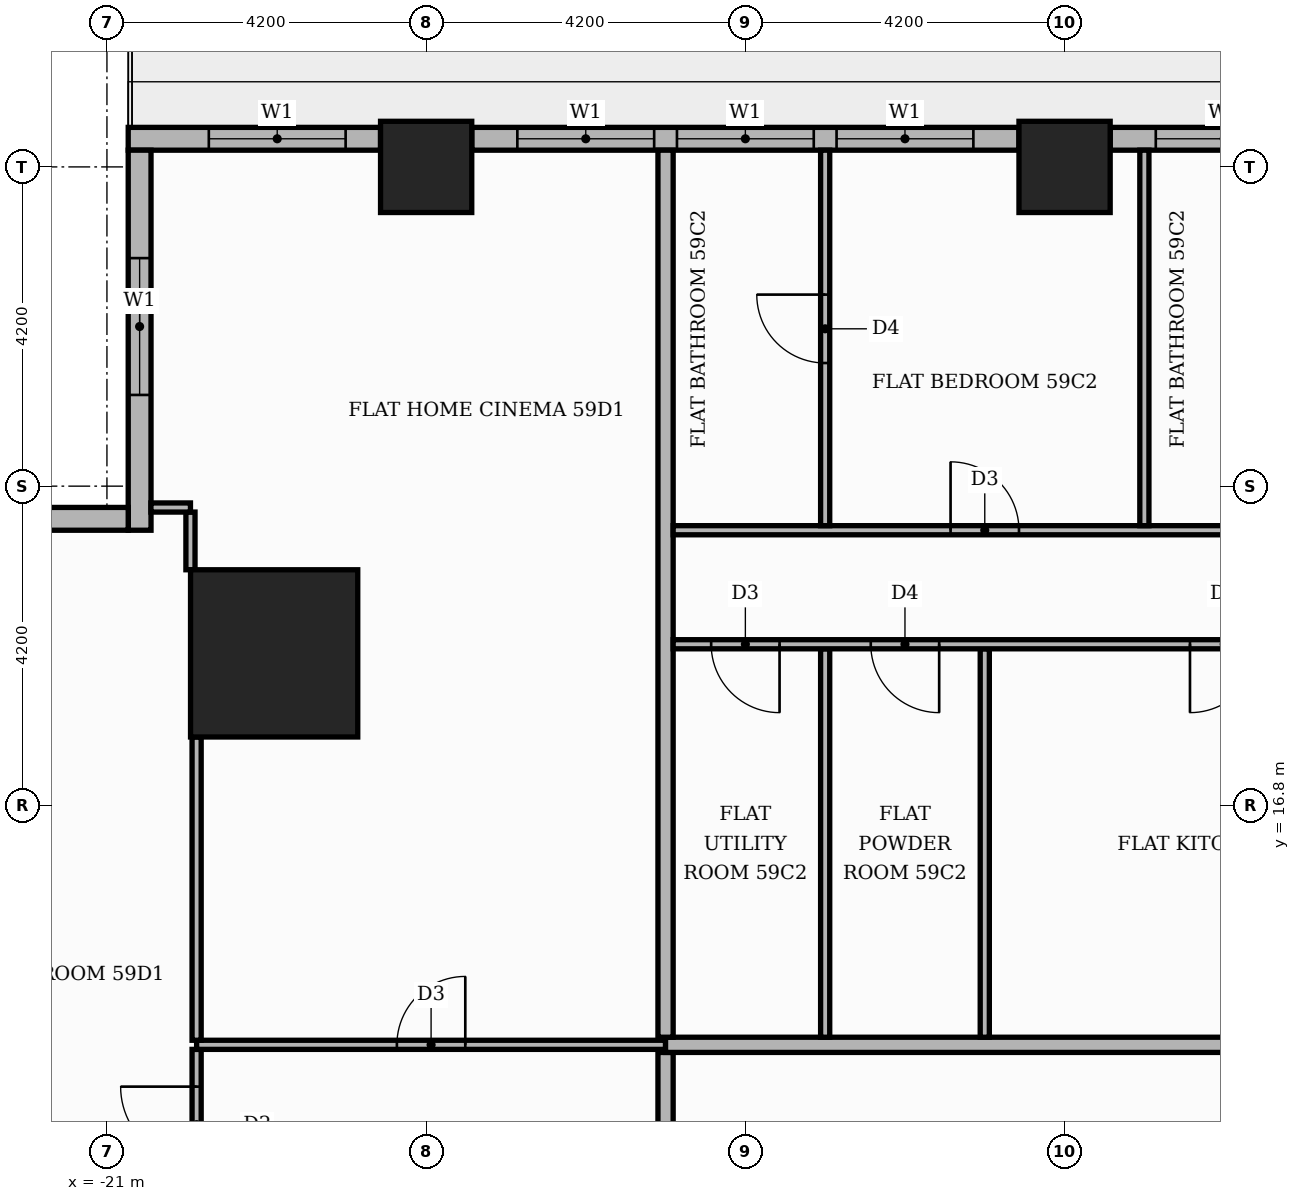
"""IFC4 building model, lengths in metres.
Left out: names, types, materials, properties, quantities, classifications, styles, units other than length and angle.
Written with IfcOpenShell. Run it as: python <this file> out.ifc"""

import sys

from ifc_helpers import new_model, si_unit, direction, frame, frame_2d, origin, origin_2d, place, context, subcontext, project, spatial, rectangle, extrude, element, fill, save


model = new_model("IFC4")
c1 = context("Model", 3, precision=1e-05, world=origin(), true_north=direction((0.0, 1.0)))
c2 = subcontext(c1, "Body", "Model", "MODEL_VIEW")
j1 = project(units=[si_unit("LENGTHUNIT", "METRE"), si_unit("PLANEANGLEUNIT", "RADIAN")], contexts=[c1])
p1 = place(None, origin())
s1 = spatial("IfcSite", under=j1, at=p1, CompositionType="ELEMENT")
p2 = place(p1, origin())
s2 = spatial("IfcBuilding", under=s1, at=p2, CompositionType="ELEMENT")
p3 = place(p2, frame((0.0, 0.0, 248.4)))
s3 = spatial("IfcBuildingStorey", under=s2, at=p3, CompositionType="ELEMENT", Elevation=248.4)
p4 = place(p3, frame((-18.8, 18.8, 0.0), z_axis=(0.0, 0.0, 1.0), x_axis=(1.0, 0.0, 0.0)))
e1 = element("IfcColumn", 1, at=p4, inside=s3, PredefinedType="COLUMN", context=c2, shape_type="SweptSolid", body=[
    extrude(rectangle(XDim=2.2, YDim=2.2, at=origin_2d()), origin(), (0.0, 0.0, 1.0), 3.9),
])
for number, where, z_axis, x_axis in (
    (2, (-8.4, 25.2, 0.0), (0.0, 0.0, 1.0), (1.0, 0.0, 0.0)),
    (3, (-16.8, 25.2, 0.0), (0.0, 0.0, 1.0), (1.0, 0.0, 0.0)),
):
    element("IfcColumn", number, at=place(p3, frame(where, z_axis=z_axis, x_axis=x_axis)), inside=s3, PredefinedType="COLUMN", context=c2, shape_type="SweptSolid", body=[
        extrude(rectangle(XDim=1.2, YDim=1.2, at=origin_2d()), origin(), (0.0, 0.0, 1.0), 3.9),
    ])
p5 = place(p3, frame((-0.6, 25.57, 0.0), z_axis=(0.0, 0.0, 1.0), x_axis=(-1.0, 0.0, 0.0)))
e4 = element("IfcWall", 4, at=p5, inside=s3, PredefinedType="STANDARD", context=c2, shape_type="SweptSolid", body=[
    extrude(rectangle(XDim=7.2, YDim=0.3, at=frame_2d((3.6, 0.0))), origin(), (0.0, 0.0, 1.0), 3.48),
])
p6 = place(p5, frame((0.6, 0.0, 0.0)))
e5 = element("IfcOpeningElement", 5, at=p6, cuts=e4, PredefinedType="OPENING", context=c2, shape_type="SweptSolid", body=[
    extrude(rectangle(XDim=1.8, YDim=2.4, at=frame_2d((0.9, 1.2))), frame((0.0, 0.16, 0.0), z_axis=(0.0, -1.0, 0.0), x_axis=(1.0, 0.0, 0.0)), (0.0, 0.0, 1.0), 0.32),
])
p7 = place(p5, frame((2.7, 0.0, 0.9)))
e6 = element("IfcOpeningElement", 6, at=p7, cuts=e4, PredefinedType="OPENING", context=c2, shape_type="SweptSolid", body=[
    extrude(rectangle(XDim=1.8, YDim=2.1, at=frame_2d((0.9, 1.05))), frame((0.0, 0.16, 0.0), z_axis=(0.0, -1.0, 0.0), x_axis=(1.0, 0.0, 0.0)), (0.0, 0.0, 1.0), 0.32),
])
p8 = place(p5, frame((4.8, 0.0, 0.9)))
e7 = element("IfcOpeningElement", 7, at=p8, cuts=e4, PredefinedType="OPENING", context=c2, shape_type="SweptSolid", body=[
    extrude(rectangle(XDim=1.8, YDim=2.1, at=frame_2d((0.9, 1.05))), frame((0.0, 0.16, 0.0), z_axis=(0.0, -1.0, 0.0), x_axis=(1.0, 0.0, 0.0)), (0.0, 0.0, 1.0), 0.32),
])
p9 = place(p3, frame((-9.0, 25.57, 0.0), z_axis=(0.0, 0.0, 1.0), x_axis=(-1.0, 0.0, 0.0)))
e8 = element("IfcWall", 8, at=p9, inside=s3, PredefinedType="STANDARD", context=c2, shape_type="SweptSolid", body=[
    extrude(rectangle(XDim=7.2, YDim=0.3, at=frame_2d((3.6, 0.0))), origin(), (0.0, 0.0, 1.0), 3.48),
])
p10 = place(p9, frame((0.6, 0.0, 0.9)))
e9 = element("IfcOpeningElement", 9, at=p10, cuts=e8, PredefinedType="OPENING", context=c2, shape_type="SweptSolid", body=[
    extrude(rectangle(XDim=1.8, YDim=2.1, at=frame_2d((0.9, 1.05))), frame((0.0, 0.16, 0.0), z_axis=(0.0, -1.0, 0.0), x_axis=(1.0, 0.0, 0.0)), (0.0, 0.0, 1.0), 0.32),
])
p11 = place(p9, frame((2.7, 0.0, 0.9)))
e10 = element("IfcOpeningElement", 10, at=p11, cuts=e8, PredefinedType="OPENING", context=c2, shape_type="SweptSolid", body=[
    extrude(rectangle(XDim=1.8, YDim=2.1, at=frame_2d((0.9, 1.05))), frame((0.0, 0.16, 0.0), z_axis=(0.0, -1.0, 0.0), x_axis=(1.0, 0.0, 0.0)), (0.0, 0.0, 1.0), 0.32),
])
p12 = place(p9, frame((4.8, 0.0, 0.9)))
e11 = element("IfcOpeningElement", 11, at=p12, cuts=e8, PredefinedType="OPENING", context=c2, shape_type="SweptSolid", body=[
    extrude(rectangle(XDim=1.8, YDim=2.1, at=frame_2d((0.9, 1.05))), frame((0.0, 0.16, 0.0), z_axis=(0.0, -1.0, 0.0), x_axis=(1.0, 0.0, 0.0)), (0.0, 0.0, 1.0), 0.32),
])
p13 = place(p3, frame((-17.4, 25.57, 0.0), z_axis=(0.0, 0.0, 1.0), x_axis=(-1.0, 0.0, 0.0)))
e12 = element("IfcWall", 12, at=p13, inside=s3, PredefinedType="STANDARD", context=c2, shape_type="SweptSolid", body=[
    extrude(rectangle(XDim=3.32, YDim=0.3, at=frame_2d((1.66, 0.0))), origin(), (0.0, 0.0, 1.0), 3.48),
])
p14 = place(p13, frame((0.459, 0.0, 0.9)))
e13 = element("IfcOpeningElement", 13, at=p14, cuts=e12, PredefinedType="OPENING", context=c2, shape_type="SweptSolid", body=[
    extrude(rectangle(XDim=1.8, YDim=2.1, at=frame_2d((0.9, 1.05))), frame((0.0, 0.16, 0.0), z_axis=(0.0, -1.0, 0.0), x_axis=(1.0, 0.0, 0.0)), (0.0, 0.0, 1.0), 0.32),
])
p15 = place(p3, frame((-20.57, 25.42, 0.0), z_axis=(0.0, 0.0, 1.0), x_axis=(0.0, -1.0, 0.0)))
e14 = element("IfcWall", 14, at=p15, inside=s3, PredefinedType="STANDARD", context=c2, shape_type="SweptSolid", body=[
    extrude(rectangle(XDim=5.0, YDim=0.3, at=frame_2d((2.5, 0.0))), origin(), (0.0, 0.0, 1.0), 3.48),
])
p16 = place(p15, frame((1.42, 0.0, 0.9)))
e15 = element("IfcOpeningElement", 15, at=p16, cuts=e14, PredefinedType="OPENING", context=c2, shape_type="SweptSolid", body=[
    extrude(rectangle(XDim=1.8, YDim=2.1, at=frame_2d((0.9, 1.05))), frame((0.0, 0.16, 0.0), z_axis=(0.0, -1.0, 0.0), x_axis=(1.0, 0.0, 0.0)), (0.0, 0.0, 1.0), 0.32),
])
p17 = place(p3, frame((-20.72, 20.57, 0.0), z_axis=(0.0, 0.0, 1.0), x_axis=(-1.0, 0.0, 0.0)))
e16 = element("IfcWall", 16, at=p17, inside=s3, PredefinedType="STANDARD", context=c2, shape_type="SweptSolid", body=[
    extrude(rectangle(XDim=5.0, YDim=0.3, at=frame_2d((2.5, 0.0))), origin(), (0.0, 0.0, 1.0), 3.48),
])
p18 = place(p17, frame((1.48, 0.0, 0.9)))
e17 = element("IfcOpeningElement", 17, at=p18, cuts=e16, PredefinedType="OPENING", context=c2, shape_type="SweptSolid", body=[
    extrude(rectangle(XDim=1.8, YDim=2.1, at=frame_2d((0.9, 1.05))), frame((0.0, 0.16, 0.0), z_axis=(0.0, -1.0, 0.0), x_axis=(1.0, 0.0, 0.0)), (0.0, 0.0, 1.0), 0.32),
])
p19 = place(p3, frame((-13.65, 11.1, 0.0), z_axis=(0.0, 0.0, 1.0), x_axis=(0.0, 1.0, 0.0)))
e18 = element("IfcWall", 18, at=p19, inside=s3, PredefinedType="PARTITIONING", context=c2, shape_type="SweptSolid", body=[
    extrude(rectangle(XDim=2.45, YDim=0.2, at=frame_2d((1.225, 0.0))), origin(), (0.0, 0.0, 1.0), 3.48),
])
p20 = place(p3, frame((-19.82, 11.61, 0.0), z_axis=(0.0, 0.0, 1.0), x_axis=(0.0, 1.0, 0.0)))
e19 = element("IfcWall", 19, at=p20, inside=s3, PredefinedType="PARTITIONING", context=c2, shape_type="SweptSolid", body=[
    extrude(rectangle(XDim=1.98, YDim=0.12, at=frame_2d((0.99, 0.0))), origin(), (0.0, 0.0, 1.0), 3.48),
])
p21 = place(p20, frame((0.49, 0.0, 0.0)))
e20 = element("IfcOpeningElement", 20, at=p21, cuts=e19, PredefinedType="OPENING", context=c2, shape_type="SweptSolid", body=[
    extrude(rectangle(XDim=1.0, YDim=2.1, at=frame_2d((0.5, 1.05))), frame((0.0, 0.07, 0.0), z_axis=(0.0, -1.0, 0.0), x_axis=(1.0, 0.0, 0.0)), (0.0, 0.0, 1.0), 0.14),
])
p22 = place(p3, frame((-19.82, 13.65, 0.0), z_axis=(0.0, 0.0, 1.0), x_axis=(1.0, 0.0, 0.0)))
e21 = element("IfcWall", 21, at=p22, inside=s3, PredefinedType="PARTITIONING", context=c2, shape_type="SweptSolid", body=[
    extrude(rectangle(XDim=6.17, YDim=0.12, at=frame_2d((3.085, 0.0))), origin(), (0.0, 0.0, 1.0), 3.48),
])
p23 = place(p22, frame((2.635, 0.0, 0.0)))
e22 = element("IfcOpeningElement", 22, at=p23, cuts=e21, PredefinedType="OPENING", context=c2, shape_type="SweptSolid", body=[
    extrude(rectangle(XDim=0.9, YDim=2.1, at=frame_2d((0.45, 1.05))), frame((0.0, 0.07, 0.0), z_axis=(0.0, -1.0, 0.0), x_axis=(1.0, 0.0, 0.0)), (0.0, 0.0, 1.0), 0.14),
])
p24 = place(p3, frame((-13.65, 13.65, 0.0), z_axis=(0.0, 0.0, 1.0), x_axis=(1.0, 0.0, 0.0)))
e23 = element("IfcWall", 23, at=p24, inside=s3, PredefinedType="PARTITIONING", context=c2, shape_type="SweptSolid", body=[
    extrude(rectangle(XDim=39.07, YDim=0.2, at=frame_2d((19.535, 0.0))), origin(), (0.0, 0.0, 1.0), 3.48),
])
p25 = place(p24, frame((24.65, 0.0, 0.0)))
e24 = element("IfcOpeningElement", 24, at=p25, cuts=e23, PredefinedType="OPENING", context=c2, shape_type="SweptSolid", body=[
    extrude(rectangle(XDim=1.1, YDim=2.4, at=frame_2d((0.55, 1.2))), frame((0.0, 0.11, 0.0), z_axis=(0.0, -1.0, 0.0), x_axis=(1.0, 0.0, 0.0)), (0.0, 0.0, 1.0), 0.22),
])
p26 = place(p24, frame((12.05, 0.0, 0.0)))
e25 = element("IfcOpeningElement", 25, at=p26, cuts=e23, PredefinedType="OPENING", context=c2, shape_type="SweptSolid", body=[
    extrude(rectangle(XDim=1.1, YDim=2.4, at=frame_2d((0.55, 1.2))), frame((0.0, 0.11, 0.0), z_axis=(0.0, -1.0, 0.0), x_axis=(1.0, 0.0, 0.0)), (0.0, 0.0, 1.0), 0.22),
])
p27 = place(p3, frame((-19.82, 13.71, 0.0), z_axis=(0.0, 0.0, 1.0), x_axis=(0.0, 1.0, 0.0)))
e26 = element("IfcWall", 26, at=p27, inside=s3, PredefinedType="PARTITIONING", context=c2, shape_type="SweptSolid", body=[
    extrude(rectangle(XDim=3.99, YDim=0.12, at=frame_2d((1.995, 0.0))), origin(), (0.0, 0.0, 1.0), 3.48),
])
p28 = place(p3, frame((-13.65, 13.75, 0.0), z_axis=(0.0, 0.0, 1.0), x_axis=(0.0, 1.0, 0.0)))
e27 = element("IfcWall", 27, at=p28, inside=s3, PredefinedType="PARTITIONING", context=c2, shape_type="SweptSolid", body=[
    extrude(rectangle(XDim=11.67, YDim=0.2, at=frame_2d((5.835, 0.0))), origin(), (0.0, 0.0, 1.0), 3.48),
])
for number, where, z_axis, x_axis in (
    (28, (-11.55, 13.75, 0.0), (0.0, 0.0, 1.0), (0.0, 1.0, 0.0)),
    (29, (-9.45, 13.75, 0.0), (0.0, 0.0, 1.0), (0.0, 1.0, 0.0)),
):
    element("IfcWall", number, at=place(p3, frame(where, z_axis=z_axis, x_axis=x_axis)), inside=s3, PredefinedType="PARTITIONING", context=c2, shape_type="SweptSolid", body=[
        extrude(rectangle(XDim=5.11, YDim=0.12, at=frame_2d((2.555, 0.0))), origin(), (0.0, 0.0, 1.0), 3.48),
    ])
p29 = place(p3, frame((-13.55, 18.92, 0.0), z_axis=(0.0, 0.0, 1.0), x_axis=(1.0, 0.0, 0.0)))
e30 = element("IfcWall", 30, at=p29, inside=s3, PredefinedType="PARTITIONING", context=c2, shape_type="SweptSolid", body=[
    extrude(rectangle(XDim=10.4, YDim=0.12, at=frame_2d((5.2, 0.0))), origin(), (0.0, 0.0, 1.0), 3.48),
])
p30 = place(p29, frame((6.8, 0.0, 0.0)))
e31 = element("IfcOpeningElement", 31, at=p30, cuts=e30, PredefinedType="OPENING", context=c2, shape_type="SweptSolid", body=[
    extrude(rectangle(XDim=0.9, YDim=2.1, at=frame_2d((0.45, 1.05))), frame((0.0, 0.07, 0.0), z_axis=(0.0, -1.0, 0.0), x_axis=(1.0, 0.0, 0.0)), (0.0, 0.0, 1.0), 0.14),
])
p31 = place(p29, frame((2.6, 0.0, 0.0)))
e32 = element("IfcOpeningElement", 32, at=p31, cuts=e30, PredefinedType="OPENING", context=c2, shape_type="SweptSolid", body=[
    extrude(rectangle(XDim=0.9, YDim=2.1, at=frame_2d((0.45, 1.05))), frame((0.0, 0.07, 0.0), z_axis=(0.0, -1.0, 0.0), x_axis=(1.0, 0.0, 0.0)), (0.0, 0.0, 1.0), 0.14),
])
p32 = place(p29, frame((0.5, 0.0, 0.0)))
e33 = element("IfcOpeningElement", 33, at=p32, cuts=e30, PredefinedType="OPENING", context=c2, shape_type="SweptSolid", body=[
    extrude(rectangle(XDim=0.9, YDim=2.1, at=frame_2d((0.45, 1.05))), frame((0.0, 0.07, 0.0), z_axis=(0.0, -1.0, 0.0), x_axis=(1.0, 0.0, 0.0)), (0.0, 0.0, 1.0), 0.14),
])
p33 = place(p3, frame((-19.901, 19.9, 0.0), z_axis=(0.0, 0.0, 1.0), x_axis=(0.0, 1.0, 0.0)))
e34 = element("IfcWall", 34, at=p33, inside=s3, PredefinedType="PARTITIONING", context=c2, shape_type="SweptSolid", body=[
    extrude(rectangle(XDim=0.759, YDim=0.12, at=frame_2d((0.379, 0.0))), origin(), (0.0, 0.0, 1.0), 3.48),
])
p34 = place(p3, frame((-13.55, 20.42, 0.0), z_axis=(0.0, 0.0, 1.0), x_axis=(1.0, 0.0, 0.0)))
e35 = element("IfcWall", 35, at=p34, inside=s3, PredefinedType="PARTITIONING", context=c2, shape_type="SweptSolid", body=[
    extrude(rectangle(XDim=18.7, YDim=0.12, at=frame_2d((9.35, 0.0))), origin(), (0.0, 0.0, 1.0), 3.48),
])
p35 = place(p34, frame((16.2, 0.0, 0.0)))
e36 = element("IfcOpeningElement", 36, at=p35, cuts=e35, PredefinedType="OPENING", context=c2, shape_type="SweptSolid", body=[
    extrude(rectangle(XDim=1.0, YDim=2.1, at=frame_2d((0.5, 1.05))), frame((0.0, 0.07, 0.0), z_axis=(0.0, -1.0, 0.0), x_axis=(1.0, 0.0, 0.0)), (0.0, 0.0, 1.0), 0.14),
])
p36 = place(p34, frame((12.05, 0.0, 0.0)))
e37 = element("IfcOpeningElement", 37, at=p36, cuts=e35, PredefinedType="OPENING", context=c2, shape_type="SweptSolid", body=[
    extrude(rectangle(XDim=0.9, YDim=2.1, at=frame_2d((0.45, 1.05))), frame((0.0, 0.07, 0.0), z_axis=(0.0, -1.0, 0.0), x_axis=(1.0, 0.0, 0.0)), (0.0, 0.0, 1.0), 0.14),
])
p37 = place(p34, frame((3.65, 0.0, 0.0)))
e38 = element("IfcOpeningElement", 38, at=p37, cuts=e35, PredefinedType="OPENING", context=c2, shape_type="SweptSolid", body=[
    extrude(rectangle(XDim=0.9, YDim=2.1, at=frame_2d((0.45, 1.05))), frame((0.0, 0.07, 0.0), z_axis=(0.0, -1.0, 0.0), x_axis=(1.0, 0.0, 0.0)), (0.0, 0.0, 1.0), 0.14),
])
p38 = place(p3, frame((-11.55, 20.48, 0.0), z_axis=(0.0, 0.0, 1.0), x_axis=(0.0, 1.0, 0.0)))
e39 = element("IfcWall", 39, at=p38, inside=s3, PredefinedType="PARTITIONING", context=c2, shape_type="SweptSolid", body=[
    extrude(rectangle(XDim=4.94, YDim=0.12, at=frame_2d((2.47, 0.0))), origin(), (0.0, 0.0, 1.0), 3.48),
])
p39 = place(p38, frame((2.14, 0.0, 0.0)))
e40 = element("IfcOpeningElement", 40, at=p39, cuts=e39, PredefinedType="OPENING", context=c2, shape_type="SweptSolid", body=[
    extrude(rectangle(XDim=0.9, YDim=2.1, at=frame_2d((0.45, 1.05))), frame((0.0, 0.07, 0.0), z_axis=(0.0, -1.0, 0.0), x_axis=(1.0, 0.0, 0.0)), (0.0, 0.0, 1.0), 0.14),
])
p40 = place(p3, frame((-7.35, 20.48, 0.0), z_axis=(0.0, 0.0, 1.0), x_axis=(0.0, 1.0, 0.0)))
e41 = element("IfcWall", 41, at=p40, inside=s3, PredefinedType="PARTITIONING", context=c2, shape_type="SweptSolid", body=[
    extrude(rectangle(XDim=4.94, YDim=0.12, at=frame_2d((2.47, 0.0))), origin(), (0.0, 0.0, 1.0), 3.48),
])
p41 = place(p3, frame((-20.421, 20.719, 0.0), z_axis=(0.0, 0.0, 1.0), x_axis=(1.0, 0.0, 0.0)))
e42 = element("IfcWall", 42, at=p41, inside=s3, PredefinedType="PARTITIONING", context=c2, shape_type="SweptSolid", body=[
    extrude(rectangle(XDim=0.52, YDim=0.12, at=frame_2d((0.26, 0.0))), origin(), (0.0, 0.0, 1.0), 3.48),
])
p42 = place(p8, origin())
e43 = element("IfcWindow", 43, at=p42, inside=s3, PartitioningType="SINGLE_PANEL", PredefinedType="WINDOW", context=c2, shape_type="SweptSolid", body=[
    extrude(rectangle(XDim=1.8, YDim=2.1, at=frame_2d((0.9, 1.05))), frame((0.0, 0.03, 0.0), z_axis=(0.0, -1.0, 0.0), x_axis=(1.0, 0.0, 0.0)), (0.0, 0.0, 1.0), 0.06),
])
fill(e7, e43)
p43 = place(p10, origin())
e44 = element("IfcWindow", 44, at=p43, inside=s3, PartitioningType="SINGLE_PANEL", PredefinedType="WINDOW", context=c2, shape_type="SweptSolid", body=[
    extrude(rectangle(XDim=1.8, YDim=2.1, at=frame_2d((0.9, 1.05))), frame((0.0, 0.03, 0.0), z_axis=(0.0, -1.0, 0.0), x_axis=(1.0, 0.0, 0.0)), (0.0, 0.0, 1.0), 0.06),
])
fill(e9, e44)
p44 = place(p11, origin())
e45 = element("IfcWindow", 45, at=p44, inside=s3, PartitioningType="SINGLE_PANEL", PredefinedType="WINDOW", context=c2, shape_type="SweptSolid", body=[
    extrude(rectangle(XDim=1.8, YDim=2.1, at=frame_2d((0.9, 1.05))), frame((0.0, 0.03, 0.0), z_axis=(0.0, -1.0, 0.0), x_axis=(1.0, 0.0, 0.0)), (0.0, 0.0, 1.0), 0.06),
])
fill(e10, e45)
p45 = place(p12, origin())
e46 = element("IfcWindow", 46, at=p45, inside=s3, PartitioningType="SINGLE_PANEL", PredefinedType="WINDOW", context=c2, shape_type="SweptSolid", body=[
    extrude(rectangle(XDim=1.8, YDim=2.1, at=frame_2d((0.9, 1.05))), frame((0.0, 0.03, 0.0), z_axis=(0.0, -1.0, 0.0), x_axis=(1.0, 0.0, 0.0)), (0.0, 0.0, 1.0), 0.06),
])
fill(e11, e46)
p46 = place(p14, origin())
e47 = element("IfcWindow", 47, at=p46, inside=s3, PartitioningType="SINGLE_PANEL", PredefinedType="WINDOW", context=c2, shape_type="SweptSolid", body=[
    extrude(rectangle(XDim=1.8, YDim=2.1, at=frame_2d((0.9, 1.05))), frame((0.0, 0.03, 0.0), z_axis=(0.0, -1.0, 0.0), x_axis=(1.0, 0.0, 0.0)), (0.0, 0.0, 1.0), 0.06),
])
fill(e13, e47)
p47 = place(p16, origin())
e48 = element("IfcWindow", 48, at=p47, inside=s3, PartitioningType="SINGLE_PANEL", PredefinedType="WINDOW", context=c2, shape_type="SweptSolid", body=[
    extrude(rectangle(XDim=1.8, YDim=2.1, at=frame_2d((0.9, 1.05))), frame((0.0, 0.03, 0.0), z_axis=(0.0, -1.0, 0.0), x_axis=(1.0, 0.0, 0.0)), (0.0, 0.0, 1.0), 0.06),
])
fill(e15, e48)
p48 = place(p30, frame((0.9, 0.0, 0.0), z_axis=(0.0, 0.0, 1.0), x_axis=(-1.0, 0.0, 0.0)))
e49 = element("IfcDoor", 49, at=p48, inside=s3, OperationType="SINGLE_SWING_LEFT", PredefinedType="DOOR", context=c2, shape_type="SweptSolid", body=[
    extrude(rectangle(XDim=0.9, YDim=2.1, at=frame_2d((0.45, 1.05))), frame((0.0, 0.025, 0.0), z_axis=(0.0, -1.0, 0.0), x_axis=(1.0, 0.0, 0.0)), (0.0, 0.0, 1.0), 0.05),
])
fill(e31, e49)
p49 = place(p31, frame((0.9, 0.0, 0.0), z_axis=(0.0, 0.0, 1.0), x_axis=(-1.0, 0.0, 0.0)))
e50 = element("IfcDoor", 50, at=p49, inside=s3, OperationType="SINGLE_SWING_RIGHT", PredefinedType="DOOR", context=c2, shape_type="SweptSolid", body=[
    extrude(rectangle(XDim=0.9, YDim=2.1, at=frame_2d((0.45, 1.05))), frame((0.0, 0.025, 0.0), z_axis=(0.0, -1.0, 0.0), x_axis=(1.0, 0.0, 0.0)), (0.0, 0.0, 1.0), 0.05),
])
fill(e32, e50)
p50 = place(p32, frame((0.9, 0.0, 0.0), z_axis=(0.0, 0.0, 1.0), x_axis=(-1.0, 0.0, 0.0)))
e51 = element("IfcDoor", 51, at=p50, inside=s3, OperationType="SINGLE_SWING_RIGHT", PredefinedType="DOOR", context=c2, shape_type="SweptSolid", body=[
    extrude(rectangle(XDim=0.9, YDim=2.1, at=frame_2d((0.45, 1.05))), frame((0.0, 0.025, 0.0), z_axis=(0.0, -1.0, 0.0), x_axis=(1.0, 0.0, 0.0)), (0.0, 0.0, 1.0), 0.05),
])
fill(e33, e51)
p51 = place(p37, origin())
e52 = element("IfcDoor", 52, at=p51, inside=s3, OperationType="SINGLE_SWING_LEFT", PredefinedType="DOOR", context=c2, shape_type="SweptSolid", body=[
    extrude(rectangle(XDim=0.9, YDim=2.1, at=frame_2d((0.45, 1.05))), frame((0.0, 0.025, 0.0), z_axis=(0.0, -1.0, 0.0), x_axis=(1.0, 0.0, 0.0)), (0.0, 0.0, 1.0), 0.05),
])
fill(e38, e52)
p52 = place(p39, origin())
e53 = element("IfcDoor", 53, at=p52, inside=s3, OperationType="SINGLE_SWING_RIGHT", PredefinedType="DOOR", context=c2, shape_type="SweptSolid", body=[
    extrude(rectangle(XDim=0.9, YDim=2.1, at=frame_2d((0.45, 1.05))), frame((0.0, 0.025, 0.0), z_axis=(0.0, -1.0, 0.0), x_axis=(1.0, 0.0, 0.0)), (0.0, 0.0, 1.0), 0.05),
])
fill(e40, e53)
p53 = place(p23, origin())
e54 = element("IfcDoor", 54, at=p53, inside=s3, OperationType="SINGLE_SWING_RIGHT", PredefinedType="DOOR", context=c2, shape_type="SweptSolid", body=[
    extrude(rectangle(XDim=0.9, YDim=2.1, at=frame_2d((0.45, 1.05))), frame((0.0, 0.025, 0.0), z_axis=(0.0, -1.0, 0.0), x_axis=(1.0, 0.0, 0.0)), (0.0, 0.0, 1.0), 0.05),
])
fill(e22, e54)
p54 = place(p21, origin())
e55 = element("IfcDoor", 55, at=p54, inside=s3, OperationType="SINGLE_SWING_RIGHT", PredefinedType="DOOR", context=c2, shape_type="SweptSolid", body=[
    extrude(rectangle(XDim=1.0, YDim=2.1, at=frame_2d((0.5, 1.05))), frame((0.0, 0.025, 0.0), z_axis=(0.0, -1.0, 0.0), x_axis=(1.0, 0.0, 0.0)), (0.0, 0.0, 1.0), 0.05),
])
fill(e20, e55)
save(model, sys.argv[1])
